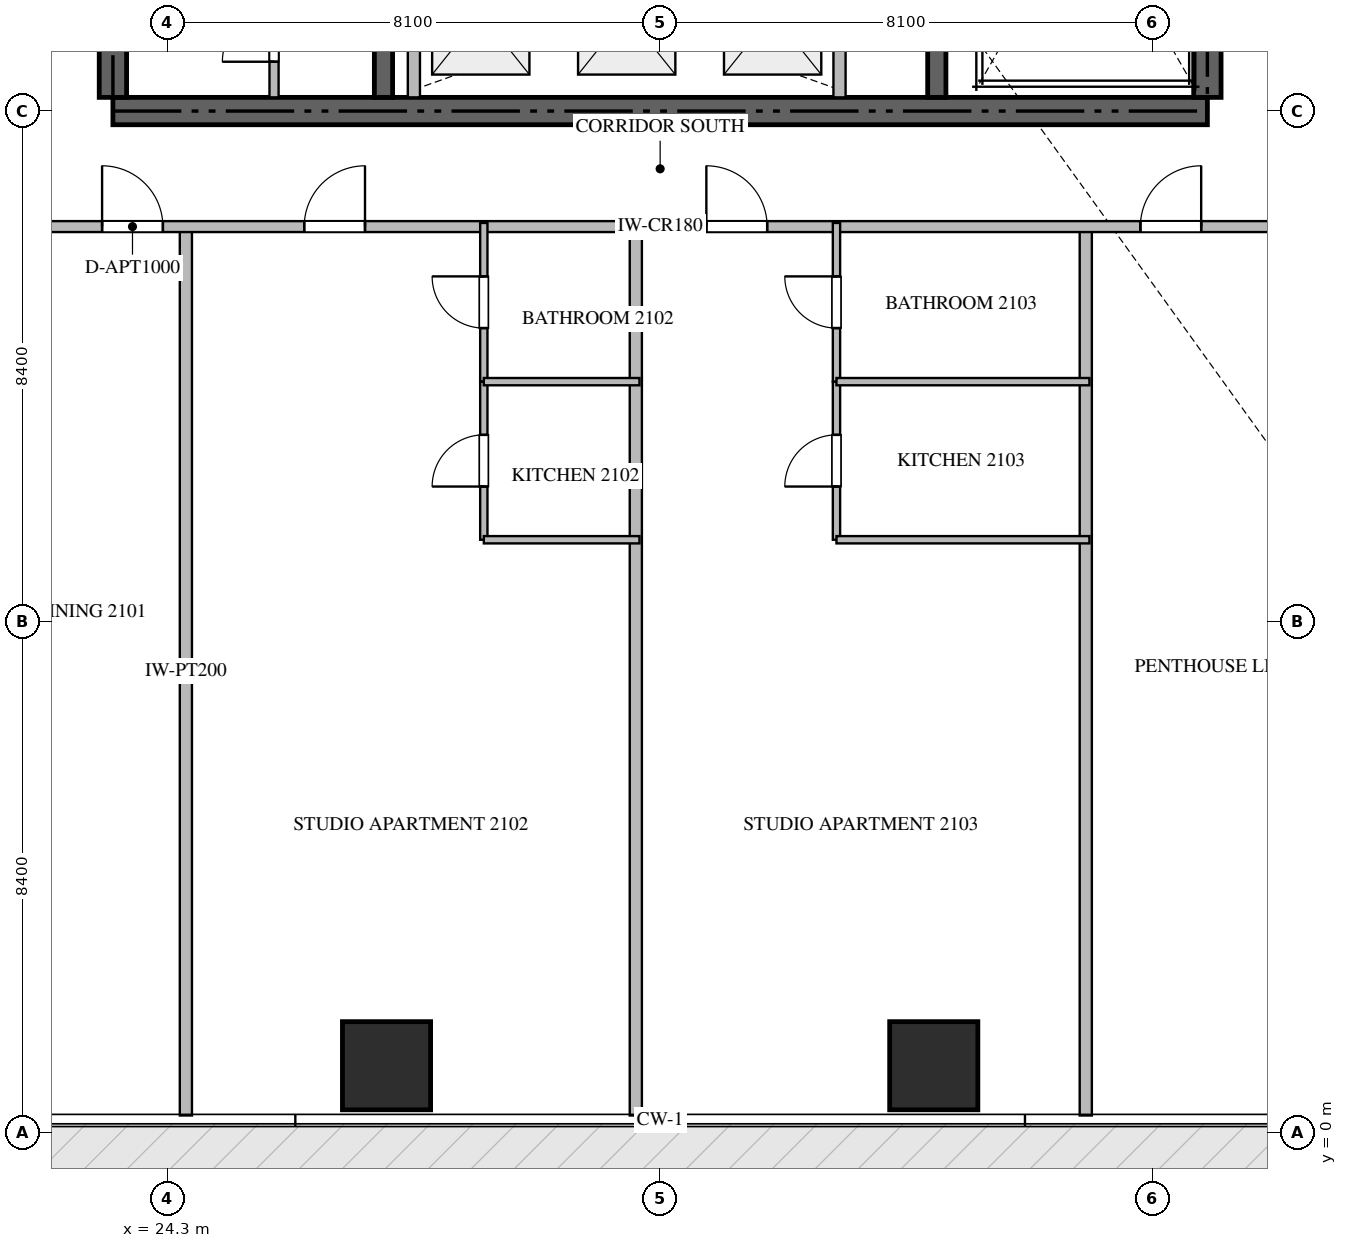
"""IFC4 building model, lengths in metres.
Left out: names, types, materials, properties, quantities, classifications, styles, units other than length and angle.
Written with IfcOpenShell. Run it as: python <this file> out.ifc"""

import sys

from ifc_helpers import new_model, si_unit, direction, frame, frame_2d, origin, origin_2d, place, context, subcontext, project, spatial, rectangle, extrude, source, transform, mapped, element, fill, save


model = new_model("IFC4")
c1 = context("Model", 3, precision=1e-05, world=origin(), true_north=direction((0.0, 1.0)))
c2 = subcontext(c1, "Body", "Model", "MODEL_VIEW")
j1 = project(units=[si_unit("LENGTHUNIT", "METRE"), si_unit("PLANEANGLEUNIT", "RADIAN")], contexts=[c1])
p1 = place(None, origin())
s1 = spatial("IfcSite", under=j1, at=p1, CompositionType="ELEMENT")
p2 = place(p1, origin())
s2 = spatial("IfcBuilding", under=s1, at=p2, CompositionType="ELEMENT")
p3 = place(p2, frame((0.0, 0.0, 86.7)))
s3 = spatial("IfcBuildingStorey", under=s2, at=p3, CompositionType="ELEMENT", Elevation=86.7)
p4 = place(p3, frame((23.4, 16.8, -0.26), z_axis=(0.0, 0.0, 1.0), x_axis=(1.0, 0.0, 0.0)))
e1 = element("IfcWall", 1, at=p4, inside=s3, PredefinedType="SHEAR", context=c2, shape_type="SweptSolid", body=[
    extrude(rectangle(XDim=18.0, YDim=0.45, at=frame_2d((9.0, 0.0))), origin(), (0.0, 0.0, 1.0), 3.748),
])
p5 = place(p3, frame((23.4, 17.025, -0.26), z_axis=(0.0, 0.0, 1.0), x_axis=(0.0, 1.0, 0.0)))
e2 = element("IfcWall", 2, at=p5, inside=s3, PredefinedType="SHEAR", context=c2, shape_type="SweptSolid", body=[
    extrude(rectangle(XDim=4.825, YDim=0.45, at=frame_2d((2.413, 0.0))), origin(), (0.0, 0.0, 1.0), 3.748),
])
p6 = place(p3, frame((41.4, 17.025, -0.26), z_axis=(0.0, 0.0, 1.0), x_axis=(0.0, 1.0, 0.0)))
e3 = element("IfcWall", 3, at=p6, inside=s3, PredefinedType="SHEAR", context=c2, shape_type="SweptSolid", body=[
    extrude(rectangle(XDim=8.325, YDim=0.45, at=frame_2d((4.163, 0.0))), origin(), (0.0, 0.0, 1.0), 3.748),
])
p7 = place(p3, frame((27.85, 17.025, -0.26), z_axis=(0.0, 0.0, 1.0), x_axis=(0.0, 1.0, 0.0)))
e4 = element("IfcWall", 4, at=p7, inside=s3, PredefinedType="SHEAR", context=c2, shape_type="SweptSolid", body=[
    extrude(rectangle(XDim=4.825, YDim=0.3, at=frame_2d((2.413, 0.0))), origin(), (0.0, 0.0, 1.0), 3.748),
])
p8 = place(p3, frame((36.95, 17.025, -0.26), z_axis=(0.0, 0.0, 1.0), x_axis=(0.0, 1.0, 0.0)))
e5 = element("IfcWall", 5, at=p8, inside=s3, PredefinedType="SHEAR", context=c2, shape_type="SweptSolid", body=[
    extrude(rectangle(XDim=8.325, YDim=0.3, at=frame_2d((4.163, 0.0))), origin(), (0.0, 0.0, 1.0), 3.748),
])
m1 = source(origin(), c2, "Body", "SweptSolid", [
    extrude(rectangle(XDim=1.45, YDim=1.45, at=origin_2d()), origin(), (0.0, 0.0, 1.0), 3.75),
])
for number, where, z_axis, x_axis in (
    (6, (27.9, 1.1, -0.26), (0.0, 0.0, 1.0), (1.0, 0.0, 0.0)),
    (7, (36.9, 1.1, -0.26), (0.0, 0.0, 1.0), (1.0, 0.0, 0.0)),
):
    element("IfcColumn", number, at=place(p3, frame(where, z_axis=z_axis, x_axis=x_axis)), inside=s3, PredefinedType="COLUMN", context=c2, shape_type="MappedRepresentation", body=[
        mapped(m1, transform((0.0, 0.0, 0.0), scale=1.0)),
    ])
for number, where, z_axis, x_axis in (
    (8, (28.35, 17.025, 0.0), (0.0, 0.0, 1.0), (0.0, 1.0, 0.0)),
    (9, (35.35, 17.025, 0.0), (0.0, 0.0, 1.0), (0.0, 1.0, 0.0)),
):
    element("IfcWall", number, at=place(p3, frame(where, z_axis=z_axis, x_axis=x_axis)), inside=s3, PredefinedType="STANDARD", context=c2, shape_type="SweptSolid", body=[
        extrude(rectangle(XDim=2.525, YDim=0.2, at=frame_2d((1.263, 0.0))), origin(), (0.0, 0.0, 1.0), 3.49),
    ])
p9 = place(p3, frame((26.05, 17.025, 0.0), z_axis=(0.0, 0.0, 1.0), x_axis=(0.0, 1.0, 0.0)))
e10 = element("IfcWall", 10, at=p9, inside=s3, PredefinedType="PARTITIONING", context=c2, shape_type="SweptSolid", body=[
    extrude(rectangle(XDim=2.023, YDim=0.15, at=frame_2d((1.012, 0.0))), origin(), (0.0, 0.0, 1.0), 3.49),
])
p10 = place(p9, frame((0.586, 0.0, 0.0)))
e11 = element("IfcOpeningElement", 11, at=p10, cuts=e10, PredefinedType="OPENING", context=c2, shape_type="SweptSolid", body=[
    extrude(rectangle(XDim=0.85, YDim=2.1, at=frame_2d((0.425, 1.05))), frame((0.0, 0.085, 0.0), z_axis=(0.0, -1.0, 0.0), x_axis=(1.0, 0.0, 0.0)), (0.0, 0.0, 1.0), 0.17),
])
for number, where, z_axis, x_axis in (
    (12, (24.6, 0.282, 0.0), (0.0, 0.0, 1.0), (0.0, 1.0, 0.0)),
    (13, (32.0, 0.282, 0.0), (0.0, 0.0, 1.0), (0.0, 1.0, 0.0)),
    (14, (39.4, 0.282, 0.0), (0.0, 0.0, 1.0), (0.0, 1.0, 0.0)),
):
    element("IfcWall", number, at=place(p3, frame(where, z_axis=z_axis, x_axis=x_axis)), inside=s3, PredefinedType="PARTITIONING", context=c2, shape_type="SweptSolid", body=[
        extrude(rectangle(XDim=14.618, YDim=0.2, at=frame_2d((7.309, 0.0))), origin(), (0.0, 0.0, 1.0), 3.49),
    ])
p11 = place(p3, frame((21.402, 14.9, 0.0), z_axis=(0.0, 0.0, 1.0), x_axis=(1.0, 0.0, 0.0)))
e15 = element("IfcWall", 15, at=p11, inside=s3, PredefinedType="PARTITIONING", context=c2, shape_type="SweptSolid", body=[
    extrude(rectangle(XDim=21.996, YDim=0.18, at=frame_2d((10.998, 0.0))), origin(), (0.0, 0.0, 1.0), 3.49),
])
p12 = place(p11, frame((1.82, 0.0, 0.0)))
e16 = element("IfcOpeningElement", 16, at=p12, cuts=e15, PredefinedType="OPENING", context=c2, shape_type="SweptSolid", body=[
    extrude(rectangle(XDim=1.0, YDim=2.15, at=frame_2d((0.5, 1.075))), frame((0.0, 0.1, 0.0), z_axis=(0.0, -1.0, 0.0), x_axis=(1.0, 0.0, 0.0)), (0.0, 0.0, 1.0), 0.2),
])
p13 = place(p11, frame((5.144, 0.0, 0.0)))
e17 = element("IfcOpeningElement", 17, at=p13, cuts=e15, PredefinedType="OPENING", context=c2, shape_type="SweptSolid", body=[
    extrude(rectangle(XDim=1.0, YDim=2.15, at=frame_2d((0.5, 1.075))), frame((0.0, 0.1, 0.0), z_axis=(0.0, -1.0, 0.0), x_axis=(1.0, 0.0, 0.0)), (0.0, 0.0, 1.0), 0.2),
])
p14 = place(p11, frame((11.758, 0.0, 0.0)))
e18 = element("IfcOpeningElement", 18, at=p14, cuts=e15, PredefinedType="OPENING", context=c2, shape_type="SweptSolid", body=[
    extrude(rectangle(XDim=1.0, YDim=2.15, at=frame_2d((0.5, 1.075))), frame((0.0, 0.1, 0.0), z_axis=(0.0, -1.0, 0.0), x_axis=(1.0, 0.0, 0.0)), (0.0, 0.0, 1.0), 0.2),
])
p15 = place(p11, frame((18.896, 0.0, 0.0)))
e19 = element("IfcOpeningElement", 19, at=p15, cuts=e15, PredefinedType="OPENING", context=c2, shape_type="SweptSolid", body=[
    extrude(rectangle(XDim=1.0, YDim=2.15, at=frame_2d((0.5, 1.075))), frame((0.0, 0.1, 0.0), z_axis=(0.0, -1.0, 0.0), x_axis=(1.0, 0.0, 0.0)), (0.0, 0.0, 1.0), 0.2),
])
p16 = place(p3, frame((29.5, 9.75, 0.0), z_axis=(0.0, 0.0, 1.0), x_axis=(0.0, 1.0, 0.0)))
e20 = element("IfcWall", 20, at=p16, inside=s3, PredefinedType="PARTITIONING", context=c2, shape_type="SweptSolid", body=[
    extrude(rectangle(XDim=2.6, YDim=0.12, at=frame_2d((1.3, 0.0))), origin(), (0.0, 0.0, 1.0), 3.49),
])
p17 = place(p16, frame((0.875, 0.0, 0.0)))
e21 = element("IfcOpeningElement", 21, at=p17, cuts=e20, PredefinedType="OPENING", context=c2, shape_type="SweptSolid", body=[
    extrude(rectangle(XDim=0.85, YDim=2.1, at=frame_2d((0.425, 1.05))), frame((0.0, 0.07, 0.0), z_axis=(0.0, -1.0, 0.0), x_axis=(1.0, 0.0, 0.0)), (0.0, 0.0, 1.0), 0.14),
])
p18 = place(p3, frame((29.5, 12.352, 0.0), z_axis=(0.0, 0.0, 1.0), x_axis=(0.0, 1.0, 0.0)))
e22 = element("IfcWall", 22, at=p18, inside=s3, PredefinedType="PARTITIONING", context=c2, shape_type="SweptSolid", body=[
    extrude(rectangle(XDim=2.608, YDim=0.12, at=frame_2d((1.304, 0.0))), origin(), (0.0, 0.0, 1.0), 3.49),
])
p19 = place(p18, frame((0.879, 0.0, 0.0)))
e23 = element("IfcOpeningElement", 23, at=p19, cuts=e22, PredefinedType="OPENING", context=c2, shape_type="SweptSolid", body=[
    extrude(rectangle(XDim=0.85, YDim=2.1, at=frame_2d((0.425, 1.05))), frame((0.0, 0.07, 0.0), z_axis=(0.0, -1.0, 0.0), x_axis=(1.0, 0.0, 0.0)), (0.0, 0.0, 1.0), 0.14),
])
for number, where, z_axis, x_axis in (
    (24, (29.5, 12.35, 0.0), (0.0, 0.0, 1.0), (1.0, 0.0, 0.0)),
    (25, (29.5, 9.75, 0.0), (0.0, 0.0, 1.0), (1.0, 0.0, 0.0)),
):
    element("IfcWall", number, at=place(p3, frame(where, z_axis=z_axis, x_axis=x_axis)), inside=s3, PredefinedType="PARTITIONING", context=c2, shape_type="SweptSolid", body=[
        extrude(rectangle(XDim=2.56, YDim=0.12, at=frame_2d((1.28, 0.0))), origin(), (0.0, 0.0, 1.0), 3.49),
    ])
p20 = place(p3, frame((35.3, 9.75, 0.0), z_axis=(0.0, 0.0, 1.0), x_axis=(0.0, 1.0, 0.0)))
e26 = element("IfcWall", 26, at=p20, inside=s3, PredefinedType="PARTITIONING", context=c2, shape_type="SweptSolid", body=[
    extrude(rectangle(XDim=2.6, YDim=0.12, at=frame_2d((1.3, 0.0))), origin(), (0.0, 0.0, 1.0), 3.49),
])
p21 = place(p20, frame((0.875, 0.0, 0.0)))
e27 = element("IfcOpeningElement", 27, at=p21, cuts=e26, PredefinedType="OPENING", context=c2, shape_type="SweptSolid", body=[
    extrude(rectangle(XDim=0.85, YDim=2.1, at=frame_2d((0.425, 1.05))), frame((0.0, 0.07, 0.0), z_axis=(0.0, -1.0, 0.0), x_axis=(1.0, 0.0, 0.0)), (0.0, 0.0, 1.0), 0.14),
])
p22 = place(p3, frame((35.3, 12.352, 0.0), z_axis=(0.0, 0.0, 1.0), x_axis=(0.0, 1.0, 0.0)))
e28 = element("IfcWall", 28, at=p22, inside=s3, PredefinedType="PARTITIONING", context=c2, shape_type="SweptSolid", body=[
    extrude(rectangle(XDim=2.608, YDim=0.12, at=frame_2d((1.304, 0.0))), origin(), (0.0, 0.0, 1.0), 3.49),
])
p23 = place(p22, frame((0.879, 0.0, 0.0)))
e29 = element("IfcOpeningElement", 29, at=p23, cuts=e28, PredefinedType="OPENING", context=c2, shape_type="SweptSolid", body=[
    extrude(rectangle(XDim=0.85, YDim=2.1, at=frame_2d((0.425, 1.05))), frame((0.0, 0.07, 0.0), z_axis=(0.0, -1.0, 0.0), x_axis=(1.0, 0.0, 0.0)), (0.0, 0.0, 1.0), 0.14),
])
for number, where, z_axis, x_axis in (
    (30, (35.3, 12.35, 0.0), (0.0, 0.0, 1.0), (1.0, 0.0, 0.0)),
    (31, (35.3, 9.75, 0.0), (0.0, 0.0, 1.0), (1.0, 0.0, 0.0)),
):
    element("IfcWall", number, at=place(p3, frame(where, z_axis=z_axis, x_axis=x_axis)), inside=s3, PredefinedType="PARTITIONING", context=c2, shape_type="SweptSolid", body=[
        extrude(rectangle(XDim=4.16, YDim=0.12, at=frame_2d((2.08, 0.0))), origin(), (0.0, 0.0, 1.0), 3.49),
    ])
m2 = source(origin(), c2, "Body", "SweptSolid", [
    extrude(rectangle(XDim=0.85, YDim=2.1, at=frame_2d((0.425, 1.05))), frame((0.0, 0.025, 0.0), z_axis=(0.0, -1.0, 0.0), x_axis=(1.0, 0.0, 0.0)), (0.0, 0.0, 1.0), 0.05),
])
p24 = place(p10, origin())
e32 = element("IfcDoor", 32, at=p24, inside=s3, OperationType="SINGLE_SWING_LEFT", PredefinedType="DOOR", context=c2, shape_type="MappedRepresentation", body=[
    mapped(m2, transform((0.0, 0.0, 0.0), scale=1.0)),
])
fill(e11, e32)
m3 = source(origin(), c2, "Body", "SweptSolid", [
    extrude(rectangle(XDim=1.0, YDim=2.15, at=frame_2d((0.5, 1.075))), frame((0.0, 0.025, 0.0), z_axis=(0.0, -1.0, 0.0), x_axis=(1.0, 0.0, 0.0)), (0.0, 0.0, 1.0), 0.05),
])
p25 = place(p12, origin())
e33 = element("IfcDoor", 33, at=p25, inside=s3, OperationType="SINGLE_SWING_LEFT", PredefinedType="DOOR", context=c2, shape_type="MappedRepresentation", body=[
    mapped(m3, transform((0.0, 0.0, 0.0), scale=1.0)),
])
fill(e16, e33)
p26 = place(p13, origin())
e34 = element("IfcDoor", 34, at=p26, inside=s3, OperationType="SINGLE_SWING_RIGHT", PredefinedType="DOOR", context=c2, shape_type="MappedRepresentation", body=[
    mapped(m3, transform((0.0, 0.0, 0.0), scale=1.0)),
])
fill(e17, e34)
p27 = place(p14, origin())
e35 = element("IfcDoor", 35, at=p27, inside=s3, OperationType="SINGLE_SWING_LEFT", PredefinedType="DOOR", context=c2, shape_type="MappedRepresentation", body=[
    mapped(m3, transform((0.0, 0.0, 0.0), scale=1.0)),
])
fill(e18, e35)
p28 = place(p15, origin())
e36 = element("IfcDoor", 36, at=p28, inside=s3, OperationType="SINGLE_SWING_RIGHT", PredefinedType="DOOR", context=c2, shape_type="MappedRepresentation", body=[
    mapped(m3, transform((0.0, 0.0, 0.0), scale=1.0)),
])
fill(e19, e36)
p29 = place(p17, origin())
e37 = element("IfcDoor", 37, at=p29, inside=s3, OperationType="SINGLE_SWING_LEFT", PredefinedType="DOOR", context=c2, shape_type="MappedRepresentation", body=[
    mapped(m2, transform((0.0, 0.0, 0.0), scale=1.0)),
])
fill(e21, e37)
p30 = place(p19, origin())
e38 = element("IfcDoor", 38, at=p30, inside=s3, OperationType="SINGLE_SWING_RIGHT", PredefinedType="DOOR", context=c2, shape_type="MappedRepresentation", body=[
    mapped(m2, transform((0.0, 0.0, 0.0), scale=1.0)),
])
fill(e23, e38)
p31 = place(p21, origin())
e39 = element("IfcDoor", 39, at=p31, inside=s3, OperationType="SINGLE_SWING_LEFT", PredefinedType="DOOR", context=c2, shape_type="MappedRepresentation", body=[
    mapped(m2, transform((0.0, 0.0, 0.0), scale=1.0)),
])
fill(e27, e39)
p32 = place(p23, origin())
e40 = element("IfcDoor", 40, at=p32, inside=s3, OperationType="SINGLE_SWING_RIGHT", PredefinedType="DOOR", context=c2, shape_type="MappedRepresentation", body=[
    mapped(m2, transform((0.0, 0.0, 0.0), scale=1.0)),
])
fill(e29, e40)
save(model, sys.argv[1])
